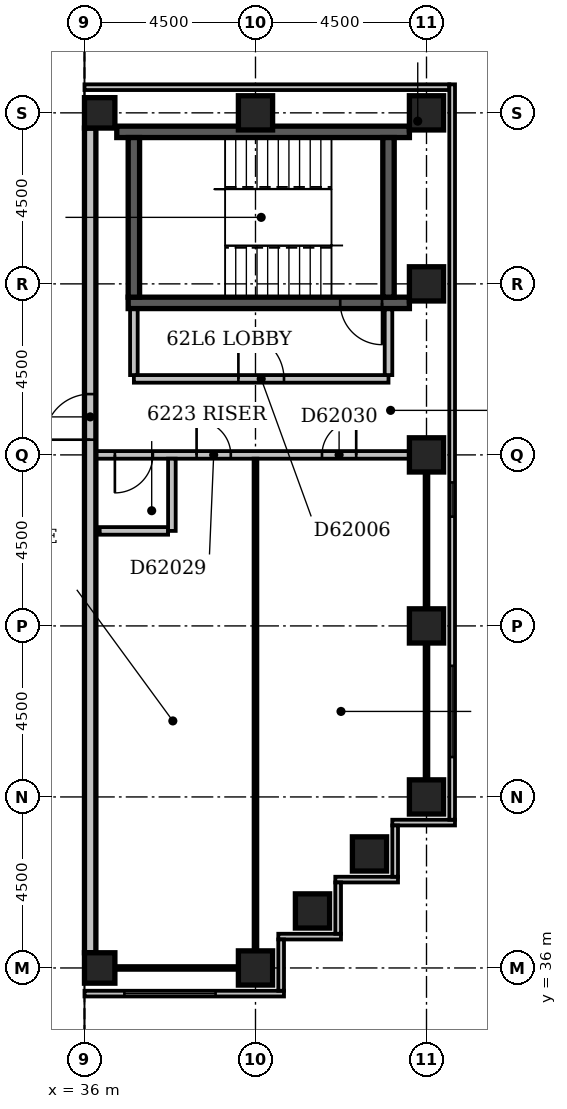
"""IFC4 building model, lengths in metres.
Left out: names, types, materials, properties, quantities, classifications, styles, units other than length and angle.
Written with IfcOpenShell. Run it as: python <this file> out.ifc"""

import sys

from ifc_helpers import new_model, si_unit, direction, frame, frame_2d, origin, origin_2d, place, context, subcontext, project, spatial, rectangle, extrude, element, fill, save


model = new_model("IFC4")
c1 = context("Model", 3, precision=1e-05, world=origin(), true_north=direction((0.0, 1.0)))
c2 = subcontext(c1, "Body", "Model", "MODEL_VIEW")
j1 = project(units=[si_unit("LENGTHUNIT", "METRE"), si_unit("PLANEANGLEUNIT", "RADIAN")], contexts=[c1])
p1 = place(None, origin())
s1 = spatial("IfcSite", under=j1, at=p1, CompositionType="ELEMENT")
p2 = place(p1, origin())
s2 = spatial("IfcBuilding", under=s1, at=p2, CompositionType="ELEMENT")
p3 = place(p2, frame((0.0, 0.0, 240.2)))
s3 = spatial("IfcBuildingStorey", under=s2, at=p3, CompositionType="ELEMENT", Elevation=240.2)
p4 = place(p3, frame((36.85, 58.0, -0.3), z_axis=(0.0, 0.0, 1.0), x_axis=(1.0, 0.0, 0.0)))
e1 = element("IfcWall", 1, at=p4, inside=s3, PredefinedType="SHEAR", context=c2, shape_type="SweptSolid", body=[
    extrude(rectangle(XDim=7.7, YDim=0.3, at=frame_2d((3.85, 0.0))), origin(), (0.0, 0.0, 1.0), 3.6),
])
p5 = place(p3, frame((37.15, 53.5, -0.3), z_axis=(0.0, 0.0, 1.0), x_axis=(1.0, 0.0, 0.0)))
e2 = element("IfcWall", 2, at=p5, inside=s3, PredefinedType="SHEAR", context=c2, shape_type="SweptSolid", body=[
    extrude(rectangle(XDim=7.4, YDim=0.3, at=frame_2d((3.7, 0.0))), origin(), (0.0, 0.0, 1.0), 3.6),
])
p6 = place(p5, frame((5.58, 0.0, 0.3)))
e3 = element("IfcOpeningElement", 3, at=p6, cuts=e2, PredefinedType="OPENING", context=c2, shape_type="SweptSolid", body=[
    extrude(rectangle(XDim=1.1, YDim=2.1, at=frame_2d((0.55, 1.05))), frame((0.0, 0.162, 0.0), z_axis=(0.0, -1.0, 0.0), x_axis=(1.0, 0.0, 0.0)), (0.0, 0.0, 1.0), 0.324),
])
for number, where, z_axis, x_axis in (
    (4, (37.3, 53.65, -0.3), (0.0, 0.0, 1.0), (0.0, 1.0, 0.0)),
    (5, (44.0, 53.65, -0.3), (0.0, 0.0, 1.0), (0.0, 1.0, 0.0)),
):
    element("IfcWall", number, at=place(p3, frame(where, z_axis=z_axis, x_axis=x_axis)), inside=s3, PredefinedType="SHEAR", context=c2, shape_type="SweptSolid", body=[
        extrude(rectangle(XDim=4.2, YDim=0.3, at=frame_2d((2.1, 0.0))), origin(), (0.0, 0.0, 1.0), 3.6),
    ])
p7 = place(p3, frame((36.4, 36.0, -0.3), z_axis=(0.0, 0.0, 1.0), x_axis=(1.0, 0.0, 0.0)))
e6 = element("IfcColumn", 6, at=p7, inside=s3, PredefinedType="COLUMN", context=c2, shape_type="SweptSolid", body=[
    extrude(rectangle(XDim=0.8, YDim=0.8, at=origin_2d()), origin(), (0.0, 0.0, 1.0), 3.6),
])
for number, where, z_axis, x_axis in (
    (7, (40.5, 36.0, -0.3), (0.0, 0.0, 1.0), (1.0, 0.0, 0.0)),
    (8, (42.0, 37.5, -0.3), (0.0, 0.0, 1.0), (1.0, 0.0, 0.0)),
    (9, (43.5, 39.0, -0.3), (0.0, 0.0, 1.0), (1.0, 0.0, 0.0)),
    (10, (45.0, 40.5, -0.3), (0.0, 0.0, 1.0), (1.0, 0.0, 0.0)),
    (11, (45.0, 45.0, -0.3), (0.0, 0.0, 1.0), (1.0, 0.0, 0.0)),
    (12, (45.0, 49.5, -0.3), (0.0, 0.0, 1.0), (1.0, 0.0, 0.0)),
    (13, (45.0, 54.0, -0.3), (0.0, 0.0, 1.0), (1.0, 0.0, 0.0)),
):
    element("IfcColumn", number, at=place(p3, frame(where, z_axis=z_axis, x_axis=x_axis)), inside=s3, PredefinedType="COLUMN", context=c2, shape_type="SweptSolid", body=[
        extrude(rectangle(XDim=0.9, YDim=0.9, at=origin_2d()), origin(), (0.0, 0.0, 1.0), 3.6),
    ])
p8 = place(p3, frame((36.4, 58.5, -0.3), z_axis=(0.0, 0.0, 1.0), x_axis=(1.0, 0.0, 0.0)))
e14 = element("IfcColumn", 14, at=p8, inside=s3, PredefinedType="COLUMN", context=c2, shape_type="SweptSolid", body=[
    extrude(rectangle(XDim=0.8, YDim=0.8, at=origin_2d()), origin(), (0.0, 0.0, 1.0), 3.6),
])
for number, where, z_axis, x_axis in (
    (15, (40.5, 58.5, -0.3), (0.0, 0.0, 1.0), (1.0, 0.0, 0.0)),
    (16, (45.0, 58.5, -0.3), (0.0, 0.0, 1.0), (1.0, 0.0, 0.0)),
):
    element("IfcColumn", number, at=place(p3, frame(where, z_axis=z_axis, x_axis=x_axis)), inside=s3, PredefinedType="COLUMN", context=c2, shape_type="SweptSolid", body=[
        extrude(rectangle(XDim=0.9, YDim=0.9, at=origin_2d()), origin(), (0.0, 0.0, 1.0), 3.6),
    ])
p9 = place(p3, frame((36.0, 35.325, 0.0), z_axis=(0.0, 0.0, 1.0), x_axis=(1.0, 0.0, 0.0)))
e17 = element("IfcWall", 17, at=p9, inside=s3, PredefinedType="STANDARD", context=c2, shape_type="SweptSolid", body=[
    extrude(rectangle(XDim=5.25, YDim=0.15, at=frame_2d((2.625, 0.0))), origin(), (0.0, 0.0, 1.0), 2.7),
])
p10 = place(p9, frame((1.05, 0.0, 0.6)))
e18 = element("IfcOpeningElement", 18, at=p10, cuts=e17, PredefinedType="OPENING", context=c2, shape_type="SweptSolid", body=[
    extrude(rectangle(XDim=2.4, YDim=1.8, at=frame_2d((1.2, 0.9))), frame((0.0, 0.087, 0.0), z_axis=(0.0, -1.0, 0.0), x_axis=(1.0, 0.0, 0.0)), (0.0, 0.0, 1.0), 0.174),
])
p11 = place(p3, frame((41.175, 35.4, 0.0), z_axis=(0.0, 0.0, 1.0), x_axis=(0.0, 1.0, 0.0)))
e19 = element("IfcWall", 19, at=p11, inside=s3, PredefinedType="STANDARD", context=c2, shape_type="SweptSolid", body=[
    extrude(rectangle(XDim=1.35, YDim=0.15, at=frame_2d((0.675, 0.0))), origin(), (0.0, 0.0, 1.0), 2.7),
])
p12 = place(p3, frame((41.1, 36.825, 0.0), z_axis=(0.0, 0.0, 1.0), x_axis=(1.0, 0.0, 0.0)))
e20 = element("IfcWall", 20, at=p12, inside=s3, PredefinedType="STANDARD", context=c2, shape_type="SweptSolid", body=[
    extrude(rectangle(XDim=1.65, YDim=0.15, at=frame_2d((0.825, 0.0))), origin(), (0.0, 0.0, 1.0), 2.7),
])
p13 = place(p3, frame((42.675, 36.9, 0.0), z_axis=(0.0, 0.0, 1.0), x_axis=(0.0, 1.0, 0.0)))
e21 = element("IfcWall", 21, at=p13, inside=s3, PredefinedType="STANDARD", context=c2, shape_type="SweptSolid", body=[
    extrude(rectangle(XDim=1.35, YDim=0.15, at=frame_2d((0.675, 0.0))), origin(), (0.0, 0.0, 1.0), 2.7),
])
p14 = place(p3, frame((42.6, 38.325, 0.0), z_axis=(0.0, 0.0, 1.0), x_axis=(1.0, 0.0, 0.0)))
e22 = element("IfcWall", 22, at=p14, inside=s3, PredefinedType="STANDARD", context=c2, shape_type="SweptSolid", body=[
    extrude(rectangle(XDim=1.65, YDim=0.15, at=frame_2d((0.825, 0.0))), origin(), (0.0, 0.0, 1.0), 2.7),
])
p15 = place(p3, frame((44.175, 38.4, 0.0), z_axis=(0.0, 0.0, 1.0), x_axis=(0.0, 1.0, 0.0)))
e23 = element("IfcWall", 23, at=p15, inside=s3, PredefinedType="STANDARD", context=c2, shape_type="SweptSolid", body=[
    extrude(rectangle(XDim=1.35, YDim=0.15, at=frame_2d((0.675, 0.0))), origin(), (0.0, 0.0, 1.0), 2.7),
])
p16 = place(p3, frame((44.1, 39.825, 0.0), z_axis=(0.0, 0.0, 1.0), x_axis=(1.0, 0.0, 0.0)))
e24 = element("IfcWall", 24, at=p16, inside=s3, PredefinedType="STANDARD", context=c2, shape_type="SweptSolid", body=[
    extrude(rectangle(XDim=1.65, YDim=0.15, at=frame_2d((0.825, 0.0))), origin(), (0.0, 0.0, 1.0), 2.7),
])
p17 = place(p3, frame((45.675, 39.9, 0.0), z_axis=(0.0, 0.0, 1.0), x_axis=(0.0, 1.0, 0.0)))
e25 = element("IfcWall", 25, at=p17, inside=s3, PredefinedType="STANDARD", context=c2, shape_type="SweptSolid", body=[
    extrude(rectangle(XDim=19.35, YDim=0.15, at=frame_2d((9.675, 0.0))), origin(), (0.0, 0.0, 1.0), 2.7),
])
p18 = place(p17, frame((1.65, 0.0, 0.6)))
e26 = element("IfcOpeningElement", 26, at=p18, cuts=e25, PredefinedType="OPENING", context=c2, shape_type="SweptSolid", body=[
    extrude(rectangle(XDim=2.4, YDim=1.8, at=frame_2d((1.2, 0.9))), frame((0.0, 0.087, 0.0), z_axis=(0.0, -1.0, 0.0), x_axis=(1.0, 0.0, 0.0)), (0.0, 0.0, 1.0), 0.174),
])
p19 = place(p17, frame((7.976, 0.0, 0.6)))
e27 = element("IfcOpeningElement", 27, at=p19, cuts=e25, PredefinedType="OPENING", context=c2, shape_type="SweptSolid", body=[
    extrude(rectangle(XDim=0.9, YDim=1.8, at=frame_2d((0.45, 0.9))), frame((0.0, 0.087, 0.0), z_axis=(0.0, -1.0, 0.0), x_axis=(1.0, 0.0, 0.0)), (0.0, 0.0, 1.0), 0.174),
])
p20 = place(p3, frame((45.6, 59.175, 0.0), z_axis=(0.0, 0.0, 1.0), x_axis=(-1.0, 0.0, 0.0)))
e28 = element("IfcWall", 28, at=p20, inside=s3, PredefinedType="STANDARD", context=c2, shape_type="SweptSolid", body=[
    extrude(rectangle(XDim=9.6, YDim=0.15, at=frame_2d((4.8, 0.0))), origin(), (0.0, 0.0, 1.0), 2.7),
])
p21 = place(p3, frame((36.15, 36.4, 0.0), z_axis=(0.0, 0.0, 1.0), x_axis=(0.0, 1.0, 0.0)))
e29 = element("IfcWall", 29, at=p21, inside=s3, PredefinedType="STANDARD", context=c2, shape_type="SweptSolid", body=[
    extrude(rectangle(XDim=21.7, YDim=0.3, at=frame_2d((10.85, 0.0))), origin(), (0.0, 0.0, 1.0), 3.3),
])
p22 = place(p21, frame((13.5, 0.0, 0.0)))
e30 = element("IfcOpeningElement", 30, at=p22, cuts=e29, PredefinedType="OPENING", context=c2, shape_type="SweptSolid", body=[
    extrude(rectangle(XDim=1.2, YDim=2.4, at=frame_2d((0.6, 1.2))), frame((0.0, 0.162, 0.0), z_axis=(0.0, -1.0, 0.0), x_axis=(1.0, 0.0, 0.0)), (0.0, 0.0, 1.0), 0.324),
])
p23 = place(p3, frame((37.3, 51.5, 0.0), z_axis=(0.0, 0.0, 1.0), x_axis=(1.0, 0.0, 0.0)))
e31 = element("IfcWall", 31, at=p23, inside=s3, PredefinedType="PARTITIONING", context=c2, shape_type="SweptSolid", body=[
    extrude(rectangle(XDim=6.7, YDim=0.2, at=frame_2d((3.35, 0.0))), origin(), (0.0, 0.0, 1.0), 3.3),
])
p24 = place(p23, frame((2.75, 0.0, 0.0)))
e32 = element("IfcOpeningElement", 32, at=p24, cuts=e31, PredefinedType="OPENING", context=c2, shape_type="SweptSolid", body=[
    extrude(rectangle(XDim=1.2, YDim=2.1, at=frame_2d((0.6, 1.05))), frame((0.0, 0.112, 0.0), z_axis=(0.0, -1.0, 0.0), x_axis=(1.0, 0.0, 0.0)), (0.0, 0.0, 1.0), 0.224),
])
for number, where, z_axis, x_axis in (
    (33, (44.0, 51.6, 0.0), (0.0, 0.0, 1.0), (0.0, 1.0, 0.0)),
    (34, (37.3, 51.6, 0.0), (0.0, 0.0, 1.0), (0.0, 1.0, 0.0)),
):
    element("IfcWall", number, at=place(p3, frame(where, z_axis=z_axis, x_axis=x_axis)), inside=s3, PredefinedType="PARTITIONING", context=c2, shape_type="SweptSolid", body=[
        extrude(rectangle(XDim=1.73, YDim=0.2, at=frame_2d((0.865, 0.0))), origin(), (0.0, 0.0, 1.0), 3.3),
    ])
p25 = place(p3, frame((36.45, 36.0, 0.0), z_axis=(0.0, 0.0, 1.0), x_axis=(1.0, 0.0, 0.0)))
e35 = element("IfcWall", 35, at=p25, inside=s3, PredefinedType="PARTITIONING", context=c2, shape_type="SweptSolid", body=[
    extrude(rectangle(XDim=3.6, YDim=0.1, at=frame_2d((1.8, 0.0))), origin(), (0.0, 0.0, 1.0), 2.7),
])
p26 = place(p3, frame((40.5, 36.45, 0.0), z_axis=(0.0, 0.0, 1.0), x_axis=(0.0, 1.0, 0.0)))
e36 = element("IfcWall", 36, at=p26, inside=s3, PredefinedType="PARTITIONING", context=c2, shape_type="SweptSolid", body=[
    extrude(rectangle(XDim=12.95, YDim=0.1, at=frame_2d((6.475, 0.0))), origin(), (0.0, 0.0, 1.0), 3.3),
])
p27 = place(p3, frame((45.0, 40.95, 0.0), z_axis=(0.0, 0.0, 1.0), x_axis=(0.0, 1.0, 0.0)))
e37 = element("IfcWall", 37, at=p27, inside=s3, PredefinedType="PARTITIONING", context=c2, shape_type="SweptSolid", body=[
    extrude(rectangle(XDim=8.1, YDim=0.1, at=frame_2d((4.05, 0.0))), origin(), (0.0, 0.0, 1.0), 2.7),
])
p28 = place(p3, frame((36.4, 47.5, 0.0), z_axis=(0.0, 0.0, 1.0), x_axis=(1.0, 0.0, 0.0)))
e38 = element("IfcWall", 38, at=p28, inside=s3, PredefinedType="PARTITIONING", context=c2, shape_type="SweptSolid", body=[
    extrude(rectangle(XDim=1.8, YDim=0.2, at=frame_2d((0.9, 0.0))), origin(), (0.0, 0.0, 1.0), 3.3),
])
p29 = place(p3, frame((38.3, 47.5, 0.0), z_axis=(0.0, 0.0, 1.0), x_axis=(0.0, 1.0, 0.0)))
e39 = element("IfcWall", 39, at=p29, inside=s3, PredefinedType="PARTITIONING", context=c2, shape_type="SweptSolid", body=[
    extrude(rectangle(XDim=1.9, YDim=0.2, at=frame_2d((0.95, 0.0))), origin(), (0.0, 0.0, 1.0), 3.3),
])
p30 = place(p3, frame((36.0, 49.5, 0.0), z_axis=(0.0, 0.0, 1.0), x_axis=(1.0, 0.0, 0.0)))
e40 = element("IfcWall", 40, at=p30, inside=s3, PredefinedType="PARTITIONING", context=c2, shape_type="SweptSolid", body=[
    extrude(rectangle(XDim=8.55, YDim=0.2, at=frame_2d((4.275, 0.0))), origin(), (0.0, 0.0, 1.0), 3.3),
])
p31 = place(p30, frame((2.95, 0.0, 0.0)))
e41 = element("IfcOpeningElement", 41, at=p31, cuts=e40, PredefinedType="OPENING", context=c2, shape_type="SweptSolid", body=[
    extrude(rectangle(XDim=0.9, YDim=2.1, at=frame_2d((0.45, 1.05))), frame((0.0, 0.112, 0.0), z_axis=(0.0, -1.0, 0.0), x_axis=(1.0, 0.0, 0.0)), (0.0, 0.0, 1.0), 0.224),
])
p32 = place(p30, frame((6.25, 0.0, 0.0)))
e42 = element("IfcOpeningElement", 42, at=p32, cuts=e40, PredefinedType="OPENING", context=c2, shape_type="SweptSolid", body=[
    extrude(rectangle(XDim=0.9, YDim=2.1, at=frame_2d((0.45, 1.05))), frame((0.0, 0.112, 0.0), z_axis=(0.0, -1.0, 0.0), x_axis=(1.0, 0.0, 0.0)), (0.0, 0.0, 1.0), 0.224),
])
p33 = place(p30, frame((0.8, 0.0, 0.0)))
e43 = element("IfcOpeningElement", 43, at=p33, cuts=e40, PredefinedType="OPENING", context=c2, shape_type="SweptSolid", body=[
    extrude(rectangle(XDim=1.0, YDim=2.1, at=frame_2d((0.5, 1.05))), frame((0.0, 0.112, 0.0), z_axis=(0.0, -1.0, 0.0), x_axis=(1.0, 0.0, 0.0)), (0.0, 0.0, 1.0), 0.224),
])
p34 = place(p10, origin())
e44 = element("IfcWindow", 44, at=p34, inside=s3, PartitioningType="SINGLE_PANEL", PredefinedType="WINDOW", context=c2, shape_type="SweptSolid", body=[
    extrude(rectangle(XDim=2.4, YDim=1.8, at=frame_2d((1.2, 0.9))), frame((0.0, 0.03, 0.0), z_axis=(0.0, -1.0, 0.0), x_axis=(1.0, 0.0, 0.0)), (0.0, 0.0, 1.0), 0.06),
])
fill(e18, e44)
p35 = place(p18, origin())
e45 = element("IfcWindow", 45, at=p35, inside=s3, PartitioningType="SINGLE_PANEL", PredefinedType="WINDOW", context=c2, shape_type="SweptSolid", body=[
    extrude(rectangle(XDim=2.4, YDim=1.8, at=frame_2d((1.2, 0.9))), frame((0.0, 0.03, 0.0), z_axis=(0.0, -1.0, 0.0), x_axis=(1.0, 0.0, 0.0)), (0.0, 0.0, 1.0), 0.06),
])
fill(e26, e45)
p36 = place(p19, origin())
e46 = element("IfcWindow", 46, at=p36, inside=s3, PartitioningType="SINGLE_PANEL", PredefinedType="WINDOW", context=c2, shape_type="SweptSolid", body=[
    extrude(rectangle(XDim=0.9, YDim=1.8, at=frame_2d((0.45, 0.9))), frame((0.0, 0.03, 0.0), z_axis=(0.0, -1.0, 0.0), x_axis=(1.0, 0.0, 0.0)), (0.0, 0.0, 1.0), 0.06),
])
fill(e27, e46)
p37 = place(p22, origin())
e47 = element("IfcDoor", 47, at=p37, inside=s3, OperationType="DOUBLE_DOOR_SINGLE_SWING", PredefinedType="DOOR", context=c2, shape_type="SweptSolid", body=[
    extrude(rectangle(XDim=1.2, YDim=2.4, at=frame_2d((0.6, 1.2))), frame((0.0, 0.025, 0.0), z_axis=(0.0, -1.0, 0.0), x_axis=(1.0, 0.0, 0.0)), (0.0, 0.0, 1.0), 0.05),
])
fill(e30, e47)
p38 = place(p24, origin())
e48 = element("IfcDoor", 48, at=p38, inside=s3, OperationType="SINGLE_SWING_LEFT", PredefinedType="DOOR", context=c2, shape_type="SweptSolid", body=[
    extrude(rectangle(XDim=1.2, YDim=2.1, at=frame_2d((0.6, 1.05))), frame((0.0, 0.025, 0.0), z_axis=(0.0, -1.0, 0.0), x_axis=(1.0, 0.0, 0.0)), (0.0, 0.0, 1.0), 0.05),
])
fill(e32, e48)
p39 = place(p6, origin())
e49 = element("IfcDoor", 49, at=p39, inside=s3, OperationType="SINGLE_SWING_RIGHT", PredefinedType="DOOR", context=c2, shape_type="SweptSolid", body=[
    extrude(rectangle(XDim=1.1, YDim=2.1, at=frame_2d((0.55, 1.05))), frame((0.0, 0.025, 0.0), z_axis=(0.0, -1.0, 0.0), x_axis=(1.0, 0.0, 0.0)), (0.0, 0.0, 1.0), 0.05),
])
fill(e3, e49)
p40 = place(p31, origin())
e50 = element("IfcDoor", 50, at=p40, inside=s3, OperationType="SINGLE_SWING_LEFT", PredefinedType="DOOR", context=c2, shape_type="SweptSolid", body=[
    extrude(rectangle(XDim=0.9, YDim=2.1, at=frame_2d((0.45, 1.05))), frame((0.0, 0.025, 0.0), z_axis=(0.0, -1.0, 0.0), x_axis=(1.0, 0.0, 0.0)), (0.0, 0.0, 1.0), 0.05),
])
fill(e41, e50)
p41 = place(p32, frame((0.9, 0.0, 0.0), z_axis=(0.0, 0.0, 1.0), x_axis=(-1.0, 0.0, 0.0)))
e51 = element("IfcDoor", 51, at=p41, inside=s3, OperationType="SINGLE_SWING_LEFT", PredefinedType="DOOR", context=c2, shape_type="SweptSolid", body=[
    extrude(rectangle(XDim=0.9, YDim=2.1, at=frame_2d((0.45, 1.05))), frame((0.0, 0.025, 0.0), z_axis=(0.0, -1.0, 0.0), x_axis=(1.0, 0.0, 0.0)), (0.0, 0.0, 1.0), 0.05),
])
fill(e42, e51)
p42 = place(p33, frame((1.0, 0.0, 0.0), z_axis=(0.0, 0.0, 1.0), x_axis=(-1.0, 0.0, 0.0)))
e52 = element("IfcDoor", 52, at=p42, inside=s3, OperationType="SINGLE_SWING_RIGHT", PredefinedType="DOOR", context=c2, shape_type="SweptSolid", body=[
    extrude(rectangle(XDim=1.0, YDim=2.1, at=frame_2d((0.5, 1.05))), frame((0.0, 0.025, 0.0), z_axis=(0.0, -1.0, 0.0), x_axis=(1.0, 0.0, 0.0)), (0.0, 0.0, 1.0), 0.05),
])
fill(e43, e52)
save(model, sys.argv[1])
